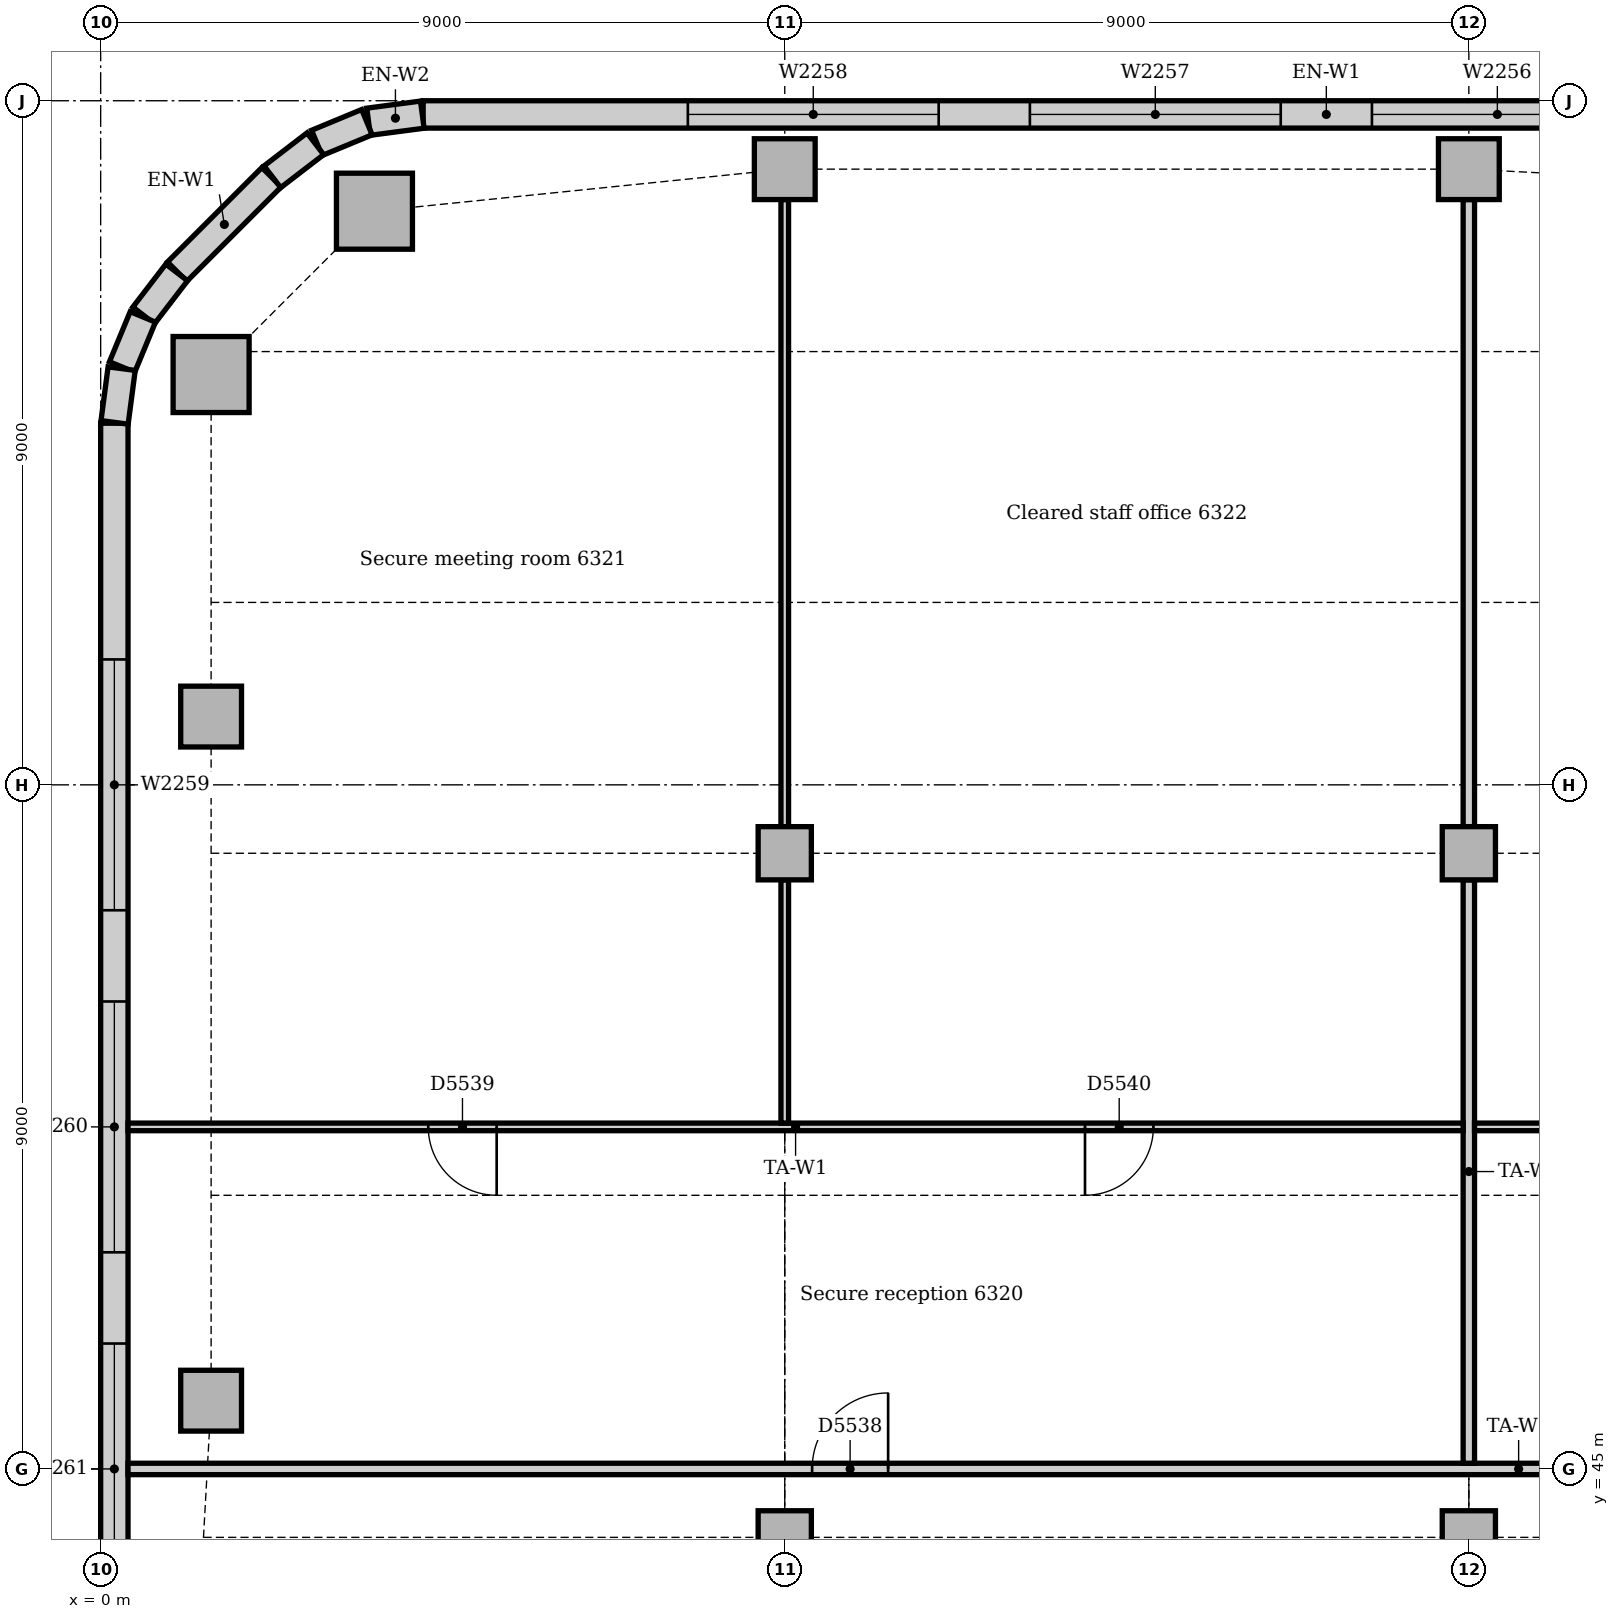
"""IFC4 building model, lengths in metres.
Left out: names, types, materials, properties, quantities, classifications, styles, units other than length and angle.
Written with IfcOpenShell. Run it as: python <this file> out.ifc"""

import sys

from ifc_helpers import new_model, si_unit, direction, frame, frame_2d, origin, origin_2d, place, context, subcontext, project, spatial, rectangle, extrude, element, fill, save


model = new_model("IFC4")
c1 = context("Model", 3, precision=1e-05, world=origin(), true_north=direction((0.0, 1.0)))
c2 = subcontext(c1, "Body", "Model", "MODEL_VIEW")
j1 = project(units=[si_unit("LENGTHUNIT", "METRE"), si_unit("PLANEANGLEUNIT", "RADIAN")], contexts=[c1])
p1 = place(None, origin())
s1 = spatial("IfcSite", under=j1, at=p1, CompositionType="ELEMENT")
p2 = place(p1, origin())
s2 = spatial("IfcBuilding", under=s1, at=p2, CompositionType="ELEMENT")
p3 = place(p2, frame((0.0, 0.0, 263.0)))
s3 = spatial("IfcBuildingStorey", under=s2, at=p3, CompositionType="ELEMENT", Elevation=263.0)
for number, where, z_axis, x_axis in (
    (1, (3.602, 61.547, 0.0), (0.0, 0.0, 1.0), (1.0, 0.0, 0.0)),
    (2, (1.453, 59.398, 0.0), (0.0, 0.0, 1.0), (1.0, 0.0, 0.0)),
):
    element("IfcColumn", number, at=place(p3, frame(where, z_axis=z_axis, x_axis=x_axis)), inside=s3, PredefinedType="COLUMN", context=c2, shape_type="SweptSolid", body=[
        extrude(rectangle(XDim=1.0, YDim=1.0, at=origin_2d()), origin(), (0.0, 0.0, 1.0), 3.85),
    ])
for number, where, z_axis, x_axis in (
    (3, (9.0, 62.1, 0.0), (0.0, 0.0, 1.0), (1.0, 0.0, 0.0)),
    (4, (18.0, 62.1, 0.0), (0.0, 0.0, 1.0), (1.0, 0.0, 0.0)),
    (5, (1.453, 45.898, 0.0), (0.0, 0.0, 1.0), (1.0, 0.0, 0.0)),
    (6, (1.453, 54.898, 0.0), (0.0, 0.0, 1.0), (1.0, 0.0, 0.0)),
):
    element("IfcColumn", number, at=place(p3, frame(where, z_axis=z_axis, x_axis=x_axis)), inside=s3, PredefinedType="COLUMN", context=c2, shape_type="SweptSolid", body=[
        extrude(rectangle(XDim=0.8, YDim=0.8, at=origin_2d()), origin(), (0.0, 0.0, 1.0), 3.85),
    ])
for number, where, z_axis, x_axis in (
    (7, (9.0, 44.1, 0.0), (0.0, 0.0, 1.0), (1.0, 0.0, 0.0)),
    (8, (9.0, 53.1, 0.0), (0.0, 0.0, 1.0), (1.0, 0.0, 0.0)),
    (9, (18.0, 44.1, 0.0), (0.0, 0.0, 1.0), (1.0, 0.0, 0.0)),
    (10, (18.0, 53.1, 0.0), (0.0, 0.0, 1.0), (1.0, 0.0, 0.0)),
):
    element("IfcColumn", number, at=place(p3, frame(where, z_axis=z_axis, x_axis=x_axis)), inside=s3, PredefinedType="COLUMN", context=c2, shape_type="SweptSolid", body=[
        extrude(rectangle(XDim=0.7, YDim=0.7, at=origin_2d()), origin(), (0.0, 0.0, 1.0), 3.85),
    ])
p4 = place(p3, frame((28.007, 62.82, 0.0), z_axis=(0.0, 0.0, 1.0), x_axis=(-1.0, 0.0, 0.0)))
e11 = element("IfcWall", 11, at=p4, inside=s3, PredefinedType="STANDARD", context=c2, shape_type="SweptSolid", body=[
    extrude(rectangle(XDim=23.765, YDim=0.36, at=frame_2d((11.882, 0.0))), origin(), (0.0, 0.0, 1.0), 3.85),
])
p5 = place(p4, frame((3.482, 0.0, 0.9)))
e12 = element("IfcOpeningElement", 12, at=p5, cuts=e11, PredefinedType="OPENING", context=c2, shape_type="SweptSolid", body=[
    extrude(rectangle(XDim=3.3, YDim=1.6, at=frame_2d((1.65, 0.8))), frame((0.0, 0.19, 0.0), z_axis=(0.0, -1.0, 0.0), x_axis=(1.0, 0.0, 0.0)), (0.0, 0.0, 1.0), 0.38),
])
p6 = place(p4, frame((7.982, 0.0, 0.9)))
e13 = element("IfcOpeningElement", 13, at=p6, cuts=e11, PredefinedType="OPENING", context=c2, shape_type="SweptSolid", body=[
    extrude(rectangle(XDim=3.3, YDim=1.6, at=frame_2d((1.65, 0.8))), frame((0.0, 0.19, 0.0), z_axis=(0.0, -1.0, 0.0), x_axis=(1.0, 0.0, 0.0)), (0.0, 0.0, 1.0), 0.38),
])
p7 = place(p4, frame((12.482, 0.0, 0.9)))
e14 = element("IfcOpeningElement", 14, at=p7, cuts=e11, PredefinedType="OPENING", context=c2, shape_type="SweptSolid", body=[
    extrude(rectangle(XDim=3.3, YDim=1.6, at=frame_2d((1.65, 0.8))), frame((0.0, 0.19, 0.0), z_axis=(0.0, -1.0, 0.0), x_axis=(1.0, 0.0, 0.0)), (0.0, 0.0, 1.0), 0.38),
])
p8 = place(p4, frame((16.982, 0.0, 0.9)))
e15 = element("IfcOpeningElement", 15, at=p8, cuts=e11, PredefinedType="OPENING", context=c2, shape_type="SweptSolid", body=[
    extrude(rectangle(XDim=3.3, YDim=1.6, at=frame_2d((1.65, 0.8))), frame((0.0, 0.19, 0.0), z_axis=(0.0, -1.0, 0.0), x_axis=(1.0, 0.0, 0.0)), (0.0, 0.0, 1.0), 0.38),
])
p9 = place(p3, frame((2.249, 61.994, 0.0), z_axis=(0.0, 0.0, 1.0), x_axis=(-0.707106781187, -0.707106781187, 0.0)))
e16 = element("IfcWall", 16, at=p9, inside=s3, PredefinedType="STANDARD", context=c2, shape_type="SweptSolid", body=[
    extrude(rectangle(XDim=1.757, YDim=0.36, at=frame_2d((0.879, 0.0))), origin(), (0.0, 0.0, 1.0), 3.85),
])
p10 = place(p3, frame((0.18, 58.757, 0.0), z_axis=(0.0, 0.0, 1.0), x_axis=(0.0, -1.0, 0.0)))
e17 = element("IfcWall", 17, at=p10, inside=s3, PredefinedType="STANDARD", context=c2, shape_type="SweptSolid", body=[
    extrude(rectangle(XDim=16.757, YDim=0.36, at=frame_2d((8.379, 0.0))), origin(), (0.0, 0.0, 1.0), 3.85),
])
p11 = place(p10, frame((3.107, 0.0, 0.9)))
e18 = element("IfcOpeningElement", 18, at=p11, cuts=e17, PredefinedType="OPENING", context=c2, shape_type="SweptSolid", body=[
    extrude(rectangle(XDim=3.3, YDim=1.6, at=frame_2d((1.65, 0.8))), frame((0.0, 0.19, 0.0), z_axis=(0.0, -1.0, 0.0), x_axis=(1.0, 0.0, 0.0)), (0.0, 0.0, 1.0), 0.38),
])
p12 = place(p10, frame((7.607, 0.0, 0.9)))
e19 = element("IfcOpeningElement", 19, at=p12, cuts=e17, PredefinedType="OPENING", context=c2, shape_type="SweptSolid", body=[
    extrude(rectangle(XDim=3.3, YDim=1.6, at=frame_2d((1.65, 0.8))), frame((0.0, 0.19, 0.0), z_axis=(0.0, -1.0, 0.0), x_axis=(1.0, 0.0, 0.0)), (0.0, 0.0, 1.0), 0.38),
])
p13 = place(p10, frame((12.107, 0.0, 0.9)))
e20 = element("IfcOpeningElement", 20, at=p13, cuts=e17, PredefinedType="OPENING", context=c2, shape_type="SweptSolid", body=[
    extrude(rectangle(XDim=3.3, YDim=1.6, at=frame_2d((1.65, 0.8))), frame((0.0, 0.19, 0.0), z_axis=(0.0, -1.0, 0.0), x_axis=(1.0, 0.0, 0.0)), (0.0, 0.0, 1.0), 0.38),
])
for number, where, z_axis, x_axis in (
    (21, (4.231, 62.817, 0.0), (0.0, 0.0, 1.0), (-0.991, -0.131, 0.0)),
    (22, (3.503, 62.718, 0.0), (0.0, 0.0, 1.0), (-0.924, -0.383, 0.0)),
):
    element("IfcWall", number, at=place(p3, frame(where, z_axis=z_axis, x_axis=x_axis)), inside=s3, PredefinedType="STANDARD", context=c2, shape_type="SweptSolid", body=[
        extrude(rectangle(XDim=0.713, YDim=0.36, at=frame_2d((0.356, 0.0))), origin(), (0.0, 0.0, 1.0), 3.85),
    ])
for number, where, z_axis, x_axis in (
    (23, (2.825, 62.434, 0.0), (0.0, 0.0, 1.0), (-0.793, -0.609, 0.0)),
    (24, (1.0, 60.741, 0.0), (0.0, 0.0, 1.0), (-0.609, -0.793, 0.0)),
):
    element("IfcWall", number, at=place(p3, frame(where, z_axis=z_axis, x_axis=x_axis)), inside=s3, PredefinedType="STANDARD", context=c2, shape_type="SweptSolid", body=[
        extrude(rectangle(XDim=0.713, YDim=0.36, at=frame_2d((0.357, 0.0))), origin(), (0.0, 0.0, 1.0), 3.85),
    ])
for number, where, z_axis, x_axis in (
    (25, (0.555, 60.156, 0.0), (0.0, 0.0, 1.0), (-0.383, -0.924, 0.0)),
    (26, (0.276, 59.476, 0.0), (0.0, 0.0, 1.0), (-0.131, -0.991, 0.0)),
):
    element("IfcWall", number, at=place(p3, frame(where, z_axis=z_axis, x_axis=x_axis)), inside=s3, PredefinedType="STANDARD", context=c2, shape_type="SweptSolid", body=[
        extrude(rectangle(XDim=0.713, YDim=0.36, at=frame_2d((0.356, 0.0))), origin(), (0.0, 0.0, 1.0), 3.85),
    ])
p14 = place(p3, frame((0.36, 45.0, 0.0), z_axis=(0.0, 0.0, 1.0), x_axis=(1.0, 0.0, 0.0)))
e27 = element("IfcWall", 27, at=p14, inside=s3, PredefinedType="PARTITIONING", context=c2, shape_type="SweptSolid", body=[
    extrude(rectangle(XDim=36.59, YDim=0.15, at=frame_2d((18.295, 0.0))), origin(), (0.0, 0.0, 1.0), 3.85),
])
p15 = place(p14, frame((9.0, 0.0, 0.0)))
e28 = element("IfcOpeningElement", 28, at=p15, cuts=e27, PredefinedType="OPENING", context=c2, shape_type="SweptSolid", body=[
    extrude(rectangle(XDim=1.0, YDim=2.1, at=frame_2d((0.5, 1.05))), frame((0.0, 0.085, 0.0), z_axis=(0.0, -1.0, 0.0), x_axis=(1.0, 0.0, 0.0)), (0.0, 0.0, 1.0), 0.17),
])
p16 = place(p14, frame((23.89, 0.0, 0.0)))
e29 = element("IfcOpeningElement", 29, at=p16, cuts=e27, PredefinedType="OPENING", context=c2, shape_type="SweptSolid", body=[
    extrude(rectangle(XDim=1.0, YDim=2.1, at=frame_2d((0.5, 1.05))), frame((0.0, 0.085, 0.0), z_axis=(0.0, -1.0, 0.0), x_axis=(1.0, 0.0, 0.0)), (0.0, 0.0, 1.0), 0.17),
])
p17 = place(p14, frame((33.34, 0.0, 0.0)))
e30 = element("IfcOpeningElement", 30, at=p17, cuts=e27, PredefinedType="OPENING", context=c2, shape_type="SweptSolid", body=[
    extrude(rectangle(XDim=0.9, YDim=2.1, at=frame_2d((0.45, 1.05))), frame((0.0, 0.085, 0.0), z_axis=(0.0, -1.0, 0.0), x_axis=(1.0, 0.0, 0.0)), (0.0, 0.0, 1.0), 0.17),
])
p18 = place(p3, frame((18.0, 45.075, 0.0), z_axis=(0.0, 0.0, 1.0), x_axis=(0.0, 1.0, 0.0)))
e31 = element("IfcWall", 31, at=p18, inside=s3, PredefinedType="PARTITIONING", context=c2, shape_type="SweptSolid", body=[
    extrude(rectangle(XDim=7.675, YDim=0.15, at=frame_2d((3.837, 0.0))), origin(), (0.0, 0.0, 1.0), 3.4),
])
p19 = place(p3, frame((18.0, 53.45, 0.0), z_axis=(0.0, 0.0, 1.0), x_axis=(0.0, 1.0, 0.0)))
e32 = element("IfcWall", 32, at=p19, inside=s3, PredefinedType="PARTITIONING", context=c2, shape_type="SweptSolid", body=[
    extrude(rectangle(XDim=8.25, YDim=0.15, at=frame_2d((4.125, 0.0))), origin(), (0.0, 0.0, 1.0), 3.4),
])
p20 = place(p3, frame((18.075, 49.5, 0.0), z_axis=(0.0, 0.0, 1.0), x_axis=(1.0, 0.0, 0.0)))
e33 = element("IfcWall", 33, at=p20, inside=s3, PredefinedType="PARTITIONING", context=c2, shape_type="SweptSolid", body=[
    extrude(rectangle(XDim=13.475, YDim=0.1, at=frame_2d((6.737, 0.0))), origin(), (0.0, 0.0, 1.0), 3.85),
])
p21 = place(p20, frame((2.95, 0.0, 0.0)))
e34 = element("IfcOpeningElement", 34, at=p21, cuts=e33, PredefinedType="OPENING", context=c2, shape_type="SweptSolid", body=[
    extrude(rectangle(XDim=0.9, YDim=2.1, at=frame_2d((0.45, 1.05))), frame((0.0, 0.06, 0.0), z_axis=(0.0, -1.0, 0.0), x_axis=(1.0, 0.0, 0.0)), (0.0, 0.0, 1.0), 0.12),
])
p22 = place(p20, frame((9.525, 0.0, 0.0)))
e35 = element("IfcOpeningElement", 35, at=p22, cuts=e33, PredefinedType="OPENING", context=c2, shape_type="SweptSolid", body=[
    extrude(rectangle(XDim=0.9, YDim=2.1, at=frame_2d((0.45, 1.05))), frame((0.0, 0.06, 0.0), z_axis=(0.0, -1.0, 0.0), x_axis=(1.0, 0.0, 0.0)), (0.0, 0.0, 1.0), 0.12),
])
p23 = place(p3, frame((0.36, 49.5, 0.0), z_axis=(0.0, 0.0, 1.0), x_axis=(1.0, 0.0, 0.0)))
e36 = element("IfcWall", 36, at=p23, inside=s3, PredefinedType="PARTITIONING", context=c2, shape_type="SweptSolid", body=[
    extrude(rectangle(XDim=17.565, YDim=0.1, at=frame_2d((8.783, 0.0))), origin(), (0.0, 0.0, 1.0), 3.85),
])
p24 = place(p23, frame((3.95, 0.0, 0.0)))
e37 = element("IfcOpeningElement", 37, at=p24, cuts=e36, PredefinedType="OPENING", context=c2, shape_type="SweptSolid", body=[
    extrude(rectangle(XDim=0.9, YDim=2.1, at=frame_2d((0.45, 1.05))), frame((0.0, 0.06, 0.0), z_axis=(0.0, -1.0, 0.0), x_axis=(1.0, 0.0, 0.0)), (0.0, 0.0, 1.0), 0.12),
])
p25 = place(p23, frame((12.59, 0.0, 0.0)))
e38 = element("IfcOpeningElement", 38, at=p25, cuts=e36, PredefinedType="OPENING", context=c2, shape_type="SweptSolid", body=[
    extrude(rectangle(XDim=0.9, YDim=2.1, at=frame_2d((0.45, 1.05))), frame((0.0, 0.06, 0.0), z_axis=(0.0, -1.0, 0.0), x_axis=(1.0, 0.0, 0.0)), (0.0, 0.0, 1.0), 0.12),
])
p26 = place(p3, frame((9.0, 49.55, 0.0), z_axis=(0.0, 0.0, 1.0), x_axis=(0.0, 1.0, 0.0)))
e39 = element("IfcWall", 39, at=p26, inside=s3, PredefinedType="PARTITIONING", context=c2, shape_type="SweptSolid", body=[
    extrude(rectangle(XDim=3.2, YDim=0.1, at=frame_2d((1.6, 0.0))), origin(), (0.0, 0.0, 1.0), 3.4),
])
p27 = place(p3, frame((9.0, 53.45, 0.0), z_axis=(0.0, 0.0, 1.0), x_axis=(0.0, 1.0, 0.0)))
e40 = element("IfcWall", 40, at=p27, inside=s3, PredefinedType="PARTITIONING", context=c2, shape_type="SweptSolid", body=[
    extrude(rectangle(XDim=8.25, YDim=0.1, at=frame_2d((4.125, 0.0))), origin(), (0.0, 0.0, 1.0), 3.4),
])
p28 = place(p6, origin())
e41 = element("IfcWindow", 41, at=p28, inside=s3, PartitioningType="SINGLE_PANEL", PredefinedType="WINDOW", context=c2, shape_type="SweptSolid", body=[
    extrude(rectangle(XDim=3.3, YDim=1.6, at=frame_2d((1.65, 0.8))), frame((0.0, 0.13, 0.0), z_axis=(0.0, -1.0, 0.0), x_axis=(1.0, 0.0, 0.0)), (0.0, 0.0, 1.0), 0.06),
])
fill(e13, e41)
p29 = place(p7, origin())
e42 = element("IfcWindow", 42, at=p29, inside=s3, PartitioningType="SINGLE_PANEL", PredefinedType="WINDOW", context=c2, shape_type="SweptSolid", body=[
    extrude(rectangle(XDim=3.3, YDim=1.6, at=frame_2d((1.65, 0.8))), frame((0.0, 0.13, 0.0), z_axis=(0.0, -1.0, 0.0), x_axis=(1.0, 0.0, 0.0)), (0.0, 0.0, 1.0), 0.06),
])
fill(e14, e42)
p30 = place(p8, origin())
e43 = element("IfcWindow", 43, at=p30, inside=s3, PartitioningType="SINGLE_PANEL", PredefinedType="WINDOW", context=c2, shape_type="SweptSolid", body=[
    extrude(rectangle(XDim=3.3, YDim=1.6, at=frame_2d((1.65, 0.8))), frame((0.0, 0.13, 0.0), z_axis=(0.0, -1.0, 0.0), x_axis=(1.0, 0.0, 0.0)), (0.0, 0.0, 1.0), 0.06),
])
fill(e15, e43)
p31 = place(p11, origin())
e44 = element("IfcWindow", 44, at=p31, inside=s3, PartitioningType="SINGLE_PANEL", PredefinedType="WINDOW", context=c2, shape_type="SweptSolid", body=[
    extrude(rectangle(XDim=3.3, YDim=1.6, at=frame_2d((1.65, 0.8))), frame((0.0, 0.13, 0.0), z_axis=(0.0, -1.0, 0.0), x_axis=(1.0, 0.0, 0.0)), (0.0, 0.0, 1.0), 0.06),
])
fill(e18, e44)
p32 = place(p12, origin())
e45 = element("IfcWindow", 45, at=p32, inside=s3, PartitioningType="SINGLE_PANEL", PredefinedType="WINDOW", context=c2, shape_type="SweptSolid", body=[
    extrude(rectangle(XDim=3.3, YDim=1.6, at=frame_2d((1.65, 0.8))), frame((0.0, 0.13, 0.0), z_axis=(0.0, -1.0, 0.0), x_axis=(1.0, 0.0, 0.0)), (0.0, 0.0, 1.0), 0.06),
])
fill(e19, e45)
p33 = place(p13, origin())
e46 = element("IfcWindow", 46, at=p33, inside=s3, PartitioningType="SINGLE_PANEL", PredefinedType="WINDOW", context=c2, shape_type="SweptSolid", body=[
    extrude(rectangle(XDim=3.3, YDim=1.6, at=frame_2d((1.65, 0.8))), frame((0.0, 0.13, 0.0), z_axis=(0.0, -1.0, 0.0), x_axis=(1.0, 0.0, 0.0)), (0.0, 0.0, 1.0), 0.06),
])
fill(e20, e46)
p34 = place(p15, origin())
e47 = element("IfcDoor", 47, at=p34, inside=s3, OperationType="SINGLE_SWING_RIGHT", PredefinedType="DOOR", context=c2, shape_type="SweptSolid", body=[
    extrude(rectangle(XDim=1.0, YDim=2.1, at=frame_2d((0.5, 1.05))), frame((0.0, 0.025, 0.0), z_axis=(0.0, -1.0, 0.0), x_axis=(1.0, 0.0, 0.0)), (0.0, 0.0, 1.0), 0.05),
])
fill(e28, e47)
p35 = place(p24, frame((0.9, 0.0, 0.0), z_axis=(0.0, 0.0, 1.0), x_axis=(-1.0, 0.0, 0.0)))
e48 = element("IfcDoor", 48, at=p35, inside=s3, OperationType="SINGLE_SWING_LEFT", PredefinedType="DOOR", context=c2, shape_type="SweptSolid", body=[
    extrude(rectangle(XDim=0.9, YDim=2.1, at=frame_2d((0.45, 1.05))), frame((0.0, 0.025, 0.0), z_axis=(0.0, -1.0, 0.0), x_axis=(1.0, 0.0, 0.0)), (0.0, 0.0, 1.0), 0.05),
])
fill(e37, e48)
p36 = place(p25, frame((0.9, 0.0, 0.0), z_axis=(0.0, 0.0, 1.0), x_axis=(-1.0, 0.0, 0.0)))
e49 = element("IfcDoor", 49, at=p36, inside=s3, OperationType="SINGLE_SWING_RIGHT", PredefinedType="DOOR", context=c2, shape_type="SweptSolid", body=[
    extrude(rectangle(XDim=0.9, YDim=2.1, at=frame_2d((0.45, 1.05))), frame((0.0, 0.025, 0.0), z_axis=(0.0, -1.0, 0.0), x_axis=(1.0, 0.0, 0.0)), (0.0, 0.0, 1.0), 0.05),
])
fill(e38, e49)
save(model, sys.argv[1])
